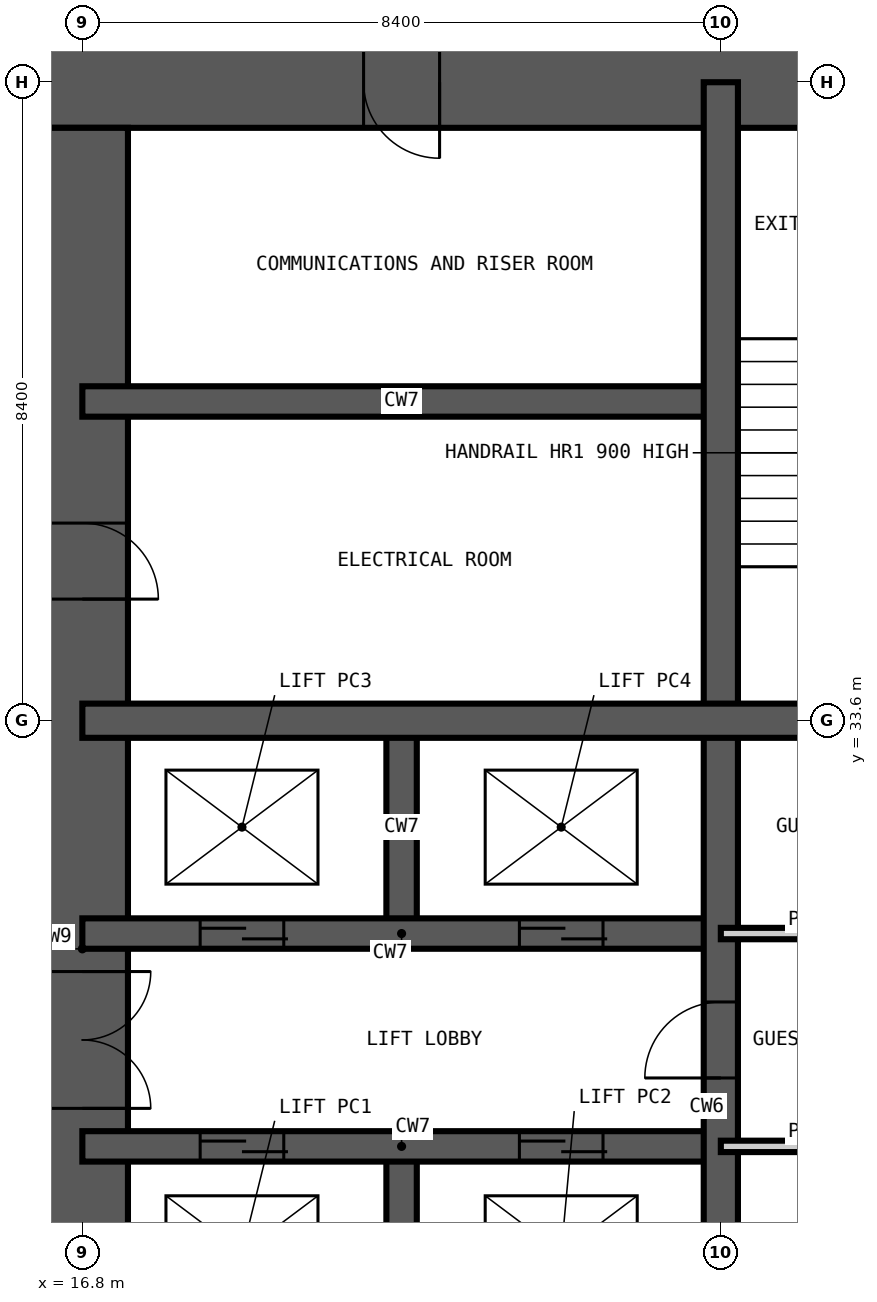
"""IFC4 building model, lengths in metres.
Left out: names, types, materials, properties, quantities, classifications, styles, units other than length and angle.
Written with IfcOpenShell. Run it as: python <this file> out.ifc"""

import sys

from ifc_helpers import new_model, si_unit, direction, frame, frame_2d, origin, place, context, subcontext, project, spatial, rectangle, extrude, element, fill, save


model = new_model("IFC4")
c1 = context("Model", 3, precision=1e-05, world=origin(), true_north=direction((0.0, 1.0)))
c2 = subcontext(c1, "Body", "Model", "MODEL_VIEW")
j1 = project(units=[si_unit("LENGTHUNIT", "METRE"), si_unit("PLANEANGLEUNIT", "RADIAN")], contexts=[c1])
p1 = place(None, origin())
s1 = spatial("IfcSite", under=j1, at=p1, CompositionType="ELEMENT")
p2 = place(p1, origin())
s2 = spatial("IfcBuilding", under=s1, at=p2, CompositionType="ELEMENT")
p3 = place(p2, frame((0.0, 0.0, 144.0)))
s3 = spatial("IfcBuildingStorey", under=s2, at=p3, CompositionType="ELEMENT", Elevation=144.0)
p4 = place(p3, frame((42.6, 42.0, -0.35), z_axis=(0.0, 0.0, 1.0), x_axis=(-1.0, 0.0, 0.0)))
e1 = element("IfcWall", 1, at=p4, inside=s3, PredefinedType="SHEAR", context=c2, shape_type="SweptSolid", body=[
    extrude(rectangle(XDim=26.4, YDim=1.2, at=frame_2d((13.2, 0.0))), origin(), (0.0, 0.0, 1.0), 3.6),
])
p5 = place(p4, frame((21.1, 0.0, 0.35)))
e2 = element("IfcOpeningElement", 2, at=p5, cuts=e1, PredefinedType="OPENING", context=c2, shape_type="SweptSolid", body=[
    extrude(rectangle(XDim=1.0, YDim=2.1, at=frame_2d((0.5, 1.05))), frame((0.0, 0.61, 0.0), z_axis=(0.0, -1.0, 0.0), x_axis=(1.0, 0.0, 0.0)), (0.0, 0.0, 1.0), 1.22),
])
p6 = place(p4, frame((10.5, 0.0, 0.35)))
e3 = element("IfcOpeningElement", 3, at=p6, cuts=e1, PredefinedType="OPENING", context=c2, shape_type="SweptSolid", body=[
    extrude(rectangle(XDim=1.2, YDim=2.2, at=frame_2d((0.6, 1.1))), frame((0.0, 0.61, 0.0), z_axis=(0.0, -1.0, 0.0), x_axis=(1.0, 0.0, 0.0)), (0.0, 0.0, 1.0), 1.22),
])
p7 = place(p3, frame((16.8, 41.4, -0.35), z_axis=(0.0, 0.0, 1.0), x_axis=(0.0, -1.0, 0.0)))
e4 = element("IfcWall", 4, at=p7, inside=s3, PredefinedType="SHEAR", context=c2, shape_type="SweptSolid", body=[
    extrude(rectangle(XDim=24.0, YDim=1.2, at=frame_2d((12.0, 0.0))), origin(), (0.0, 0.0, 1.0), 3.6),
])
p8 = place(p7, frame((11.1, 0.0, 0.35)))
e5 = element("IfcOpeningElement", 5, at=p8, cuts=e4, PredefinedType="OPENING", context=c2, shape_type="SweptSolid", body=[
    extrude(rectangle(XDim=1.8, YDim=2.2, at=frame_2d((0.9, 1.1))), frame((0.0, 0.61, 0.0), z_axis=(0.0, -1.0, 0.0), x_axis=(1.0, 0.0, 0.0)), (0.0, 0.0, 1.0), 1.22),
])
p9 = place(p7, frame((19.9, 0.0, 0.35)))
e6 = element("IfcOpeningElement", 6, at=p9, cuts=e4, PredefinedType="OPENING", context=c2, shape_type="SweptSolid", body=[
    extrude(rectangle(XDim=1.0, YDim=2.1, at=frame_2d((0.5, 1.05))), frame((0.0, 0.61, 0.0), z_axis=(0.0, -1.0, 0.0), x_axis=(1.0, 0.0, 0.0)), (0.0, 0.0, 1.0), 1.22),
])
p10 = place(p7, frame((5.2, 0.0, 0.35)))
e7 = element("IfcOpeningElement", 7, at=p10, cuts=e4, PredefinedType="OPENING", context=c2, shape_type="SweptSolid", body=[
    extrude(rectangle(XDim=1.0, YDim=2.1, at=frame_2d((0.5, 1.05))), frame((0.0, 0.61, 0.0), z_axis=(0.0, -1.0, 0.0), x_axis=(1.0, 0.0, 0.0)), (0.0, 0.0, 1.0), 1.22),
])
p11 = place(p3, frame((21.0, 22.4, -0.35), z_axis=(0.0, 0.0, 1.0), x_axis=(0.0, 1.0, 0.0)))
e8 = element("IfcWall", 8, at=p11, inside=s3, PredefinedType="SHEAR", context=c2, shape_type="SweptSolid", body=[
    extrude(rectangle(XDim=5.6, YDim=0.4, at=frame_2d((2.8, 0.0))), origin(), (0.0, 0.0, 1.0), 3.6),
])
p12 = place(p3, frame((21.0, 30.8, -0.35), z_axis=(0.0, 0.0, 1.0), x_axis=(0.0, 1.0, 0.0)))
e9 = element("IfcWall", 9, at=p12, inside=s3, PredefinedType="SHEAR", context=c2, shape_type="SweptSolid", body=[
    extrude(rectangle(XDim=2.8, YDim=0.4, at=frame_2d((1.4, 0.0))), origin(), (0.0, 0.0, 1.0), 3.6),
])
p13 = place(p3, frame((16.8, 28.0, -0.35), z_axis=(0.0, 0.0, 1.0), x_axis=(1.0, 0.0, 0.0)))
e10 = element("IfcWall", 10, at=p13, inside=s3, PredefinedType="SHEAR", context=c2, shape_type="SweptSolid", body=[
    extrude(rectangle(XDim=8.4, YDim=0.4, at=frame_2d((4.2, 0.0))), origin(), (0.0, 0.0, 1.0), 3.6),
])
p14 = place(p13, frame((1.55, 0.0, 0.35)))
e11 = element("IfcOpeningElement", 11, at=p14, cuts=e10, PredefinedType="OPENING", context=c2, shape_type="SweptSolid", body=[
    extrude(rectangle(XDim=1.1, YDim=2.2, at=frame_2d((0.55, 1.1))), frame((0.0, 0.21, 0.0), z_axis=(0.0, -1.0, 0.0), x_axis=(1.0, 0.0, 0.0)), (0.0, 0.0, 1.0), 0.42),
])
p15 = place(p13, frame((5.75, 0.0, 0.35)))
e12 = element("IfcOpeningElement", 12, at=p15, cuts=e10, PredefinedType="OPENING", context=c2, shape_type="SweptSolid", body=[
    extrude(rectangle(XDim=1.1, YDim=2.2, at=frame_2d((0.55, 1.1))), frame((0.0, 0.21, 0.0), z_axis=(0.0, -1.0, 0.0), x_axis=(1.0, 0.0, 0.0)), (0.0, 0.0, 1.0), 0.42),
])
p16 = place(p3, frame((16.8, 30.8, -0.35), z_axis=(0.0, 0.0, 1.0), x_axis=(1.0, 0.0, 0.0)))
e13 = element("IfcWall", 13, at=p16, inside=s3, PredefinedType="SHEAR", context=c2, shape_type="SweptSolid", body=[
    extrude(rectangle(XDim=8.4, YDim=0.4, at=frame_2d((4.2, 0.0))), origin(), (0.0, 0.0, 1.0), 3.6),
])
p17 = place(p16, frame((1.55, 0.0, 0.35)))
e14 = element("IfcOpeningElement", 14, at=p17, cuts=e13, PredefinedType="OPENING", context=c2, shape_type="SweptSolid", body=[
    extrude(rectangle(XDim=1.1, YDim=2.2, at=frame_2d((0.55, 1.1))), frame((0.0, 0.21, 0.0), z_axis=(0.0, -1.0, 0.0), x_axis=(1.0, 0.0, 0.0)), (0.0, 0.0, 1.0), 0.42),
])
p18 = place(p16, frame((5.75, 0.0, 0.35)))
e15 = element("IfcOpeningElement", 15, at=p18, cuts=e13, PredefinedType="OPENING", context=c2, shape_type="SweptSolid", body=[
    extrude(rectangle(XDim=1.1, YDim=2.2, at=frame_2d((0.55, 1.1))), frame((0.0, 0.21, 0.0), z_axis=(0.0, -1.0, 0.0), x_axis=(1.0, 0.0, 0.0)), (0.0, 0.0, 1.0), 0.42),
])
p19 = place(p3, frame((16.8, 37.8, -0.35), z_axis=(0.0, 0.0, 1.0), x_axis=(1.0, 0.0, 0.0)))
e16 = element("IfcWall", 16, at=p19, inside=s3, PredefinedType="SHEAR", context=c2, shape_type="SweptSolid", body=[
    extrude(rectangle(XDim=8.4, YDim=0.4, at=frame_2d((4.2, 0.0))), origin(), (0.0, 0.0, 1.0), 3.6),
])
p20 = place(p3, frame((25.2, 16.8, -0.35), z_axis=(0.0, 0.0, 1.0), x_axis=(0.0, 1.0, 0.0)))
e17 = element("IfcWall", 17, at=p20, inside=s3, PredefinedType="SHEAR", context=c2, shape_type="SweptSolid", body=[
    extrude(rectangle(XDim=25.2, YDim=0.45, at=frame_2d((12.6, 0.0))), origin(), (0.0, 0.0, 1.0), 3.6),
])
p21 = place(p20, frame((12.1, 0.0, 0.35)))
e18 = element("IfcOpeningElement", 18, at=p21, cuts=e17, PredefinedType="OPENING", context=c2, shape_type="SweptSolid", body=[
    extrude(rectangle(XDim=1.0, YDim=2.1, at=frame_2d((0.5, 1.05))), frame((0.0, 0.235, 0.0), z_axis=(0.0, -1.0, 0.0), x_axis=(1.0, 0.0, 0.0)), (0.0, 0.0, 1.0), 0.47),
])
p22 = place(p3, frame((16.8, 33.6, -0.35), z_axis=(0.0, 0.0, 1.0), x_axis=(1.0, 0.0, 0.0)))
e19 = element("IfcWall", 19, at=p22, inside=s3, PredefinedType="SHEAR", context=c2, shape_type="SweptSolid", body=[
    extrude(rectangle(XDim=25.2, YDim=0.45, at=frame_2d((12.6, 0.0))), origin(), (0.0, 0.0, 1.0), 3.6),
])
p23 = place(p3, frame((25.2, 28.0, 0.0), z_axis=(0.0, 0.0, 1.0), x_axis=(1.0, 0.0, 0.0)))
e20 = element("IfcWall", 20, at=p23, inside=s3, PredefinedType="PARTITIONING", context=c2, shape_type="SweptSolid", body=[
    extrude(rectangle(XDim=4.2, YDim=0.15, at=frame_2d((2.1, 0.0))), origin(), (0.0, 0.0, 1.0), 3.25),
])
p24 = place(p23, frame((1.6, 0.0, 0.0)))
e21 = element("IfcOpeningElement", 21, at=p24, cuts=e20, PredefinedType="OPENING", context=c2, shape_type="SweptSolid", body=[
    extrude(rectangle(XDim=1.0, YDim=2.1, at=frame_2d((0.5, 1.05))), frame((0.0, 0.085, 0.0), z_axis=(0.0, -1.0, 0.0), x_axis=(1.0, 0.0, 0.0)), (0.0, 0.0, 1.0), 0.17),
])
p25 = place(p3, frame((25.2, 30.8, 0.0), z_axis=(0.0, 0.0, 1.0), x_axis=(1.0, 0.0, 0.0)))
e22 = element("IfcWall", 22, at=p25, inside=s3, PredefinedType="PARTITIONING", context=c2, shape_type="SweptSolid", body=[
    extrude(rectangle(XDim=4.2, YDim=0.15, at=frame_2d((2.1, 0.0))), origin(), (0.0, 0.0, 1.0), 3.25),
])
p26 = place(p25, frame((1.6, 0.0, 0.0)))
e23 = element("IfcOpeningElement", 23, at=p26, cuts=e22, PredefinedType="OPENING", context=c2, shape_type="SweptSolid", body=[
    extrude(rectangle(XDim=1.0, YDim=2.1, at=frame_2d((0.5, 1.05))), frame((0.0, 0.085, 0.0), z_axis=(0.0, -1.0, 0.0), x_axis=(1.0, 0.0, 0.0)), (0.0, 0.0, 1.0), 0.17),
])
p27 = place(p14, origin())
e24 = element("IfcDoor", 24, at=p27, inside=s3, OperationType="DOUBLE_DOOR_SLIDING", PredefinedType="DOOR", context=c2, shape_type="SweptSolid", body=[
    extrude(rectangle(XDim=1.1, YDim=2.2, at=frame_2d((0.55, 1.1))), frame((0.0, 0.025, 0.0), z_axis=(0.0, -1.0, 0.0), x_axis=(1.0, 0.0, 0.0)), (0.0, 0.0, 1.0), 0.05),
])
fill(e11, e24)
p28 = place(p15, origin())
e25 = element("IfcDoor", 25, at=p28, inside=s3, OperationType="DOUBLE_DOOR_SLIDING", PredefinedType="DOOR", context=c2, shape_type="SweptSolid", body=[
    extrude(rectangle(XDim=1.1, YDim=2.2, at=frame_2d((0.55, 1.1))), frame((0.0, 0.025, 0.0), z_axis=(0.0, -1.0, 0.0), x_axis=(1.0, 0.0, 0.0)), (0.0, 0.0, 1.0), 0.05),
])
fill(e12, e25)
p29 = place(p17, origin())
e26 = element("IfcDoor", 26, at=p29, inside=s3, OperationType="DOUBLE_DOOR_SLIDING", PredefinedType="DOOR", context=c2, shape_type="SweptSolid", body=[
    extrude(rectangle(XDim=1.1, YDim=2.2, at=frame_2d((0.55, 1.1))), frame((0.0, 0.025, 0.0), z_axis=(0.0, -1.0, 0.0), x_axis=(1.0, 0.0, 0.0)), (0.0, 0.0, 1.0), 0.05),
])
fill(e14, e26)
p30 = place(p18, origin())
e27 = element("IfcDoor", 27, at=p30, inside=s3, OperationType="DOUBLE_DOOR_SLIDING", PredefinedType="DOOR", context=c2, shape_type="SweptSolid", body=[
    extrude(rectangle(XDim=1.1, YDim=2.2, at=frame_2d((0.55, 1.1))), frame((0.0, 0.025, 0.0), z_axis=(0.0, -1.0, 0.0), x_axis=(1.0, 0.0, 0.0)), (0.0, 0.0, 1.0), 0.05),
])
fill(e15, e27)
p31 = place(p8, origin())
e28 = element("IfcDoor", 28, at=p31, inside=s3, OperationType="DOUBLE_DOOR_DOUBLE_SWING", PredefinedType="DOOR", context=c2, shape_type="SweptSolid", body=[
    extrude(rectangle(XDim=1.8, YDim=2.2, at=frame_2d((0.9, 1.1))), frame((0.0, 0.025, 0.0), z_axis=(0.0, -1.0, 0.0), x_axis=(1.0, 0.0, 0.0)), (0.0, 0.0, 1.0), 0.05),
])
fill(e5, e28)
p32 = place(p10, origin())
e29 = element("IfcDoor", 29, at=p32, inside=s3, OperationType="SINGLE_SWING_RIGHT", PredefinedType="DOOR", context=c2, shape_type="SweptSolid", body=[
    extrude(rectangle(XDim=1.0, YDim=2.1, at=frame_2d((0.5, 1.05))), frame((0.0, 0.025, 0.0), z_axis=(0.0, -1.0, 0.0), x_axis=(1.0, 0.0, 0.0)), (0.0, 0.0, 1.0), 0.05),
])
fill(e7, e29)
p33 = place(p5, origin())
e30 = element("IfcDoor", 30, at=p33, inside=s3, OperationType="SINGLE_SWING_LEFT", PredefinedType="DOOR", context=c2, shape_type="SweptSolid", body=[
    extrude(rectangle(XDim=1.0, YDim=2.1, at=frame_2d((0.5, 1.05))), frame((0.0, 0.025, 0.0), z_axis=(0.0, -1.0, 0.0), x_axis=(1.0, 0.0, 0.0)), (0.0, 0.0, 1.0), 0.05),
])
fill(e2, e30)
p34 = place(p21, origin())
e31 = element("IfcDoor", 31, at=p34, inside=s3, OperationType="SINGLE_SWING_LEFT", PredefinedType="DOOR", context=c2, shape_type="SweptSolid", body=[
    extrude(rectangle(XDim=1.0, YDim=2.1, at=frame_2d((0.5, 1.05))), frame((0.0, 0.025, 0.0), z_axis=(0.0, -1.0, 0.0), x_axis=(1.0, 0.0, 0.0)), (0.0, 0.0, 1.0), 0.05),
])
fill(e18, e31)
save(model, sys.argv[1])
